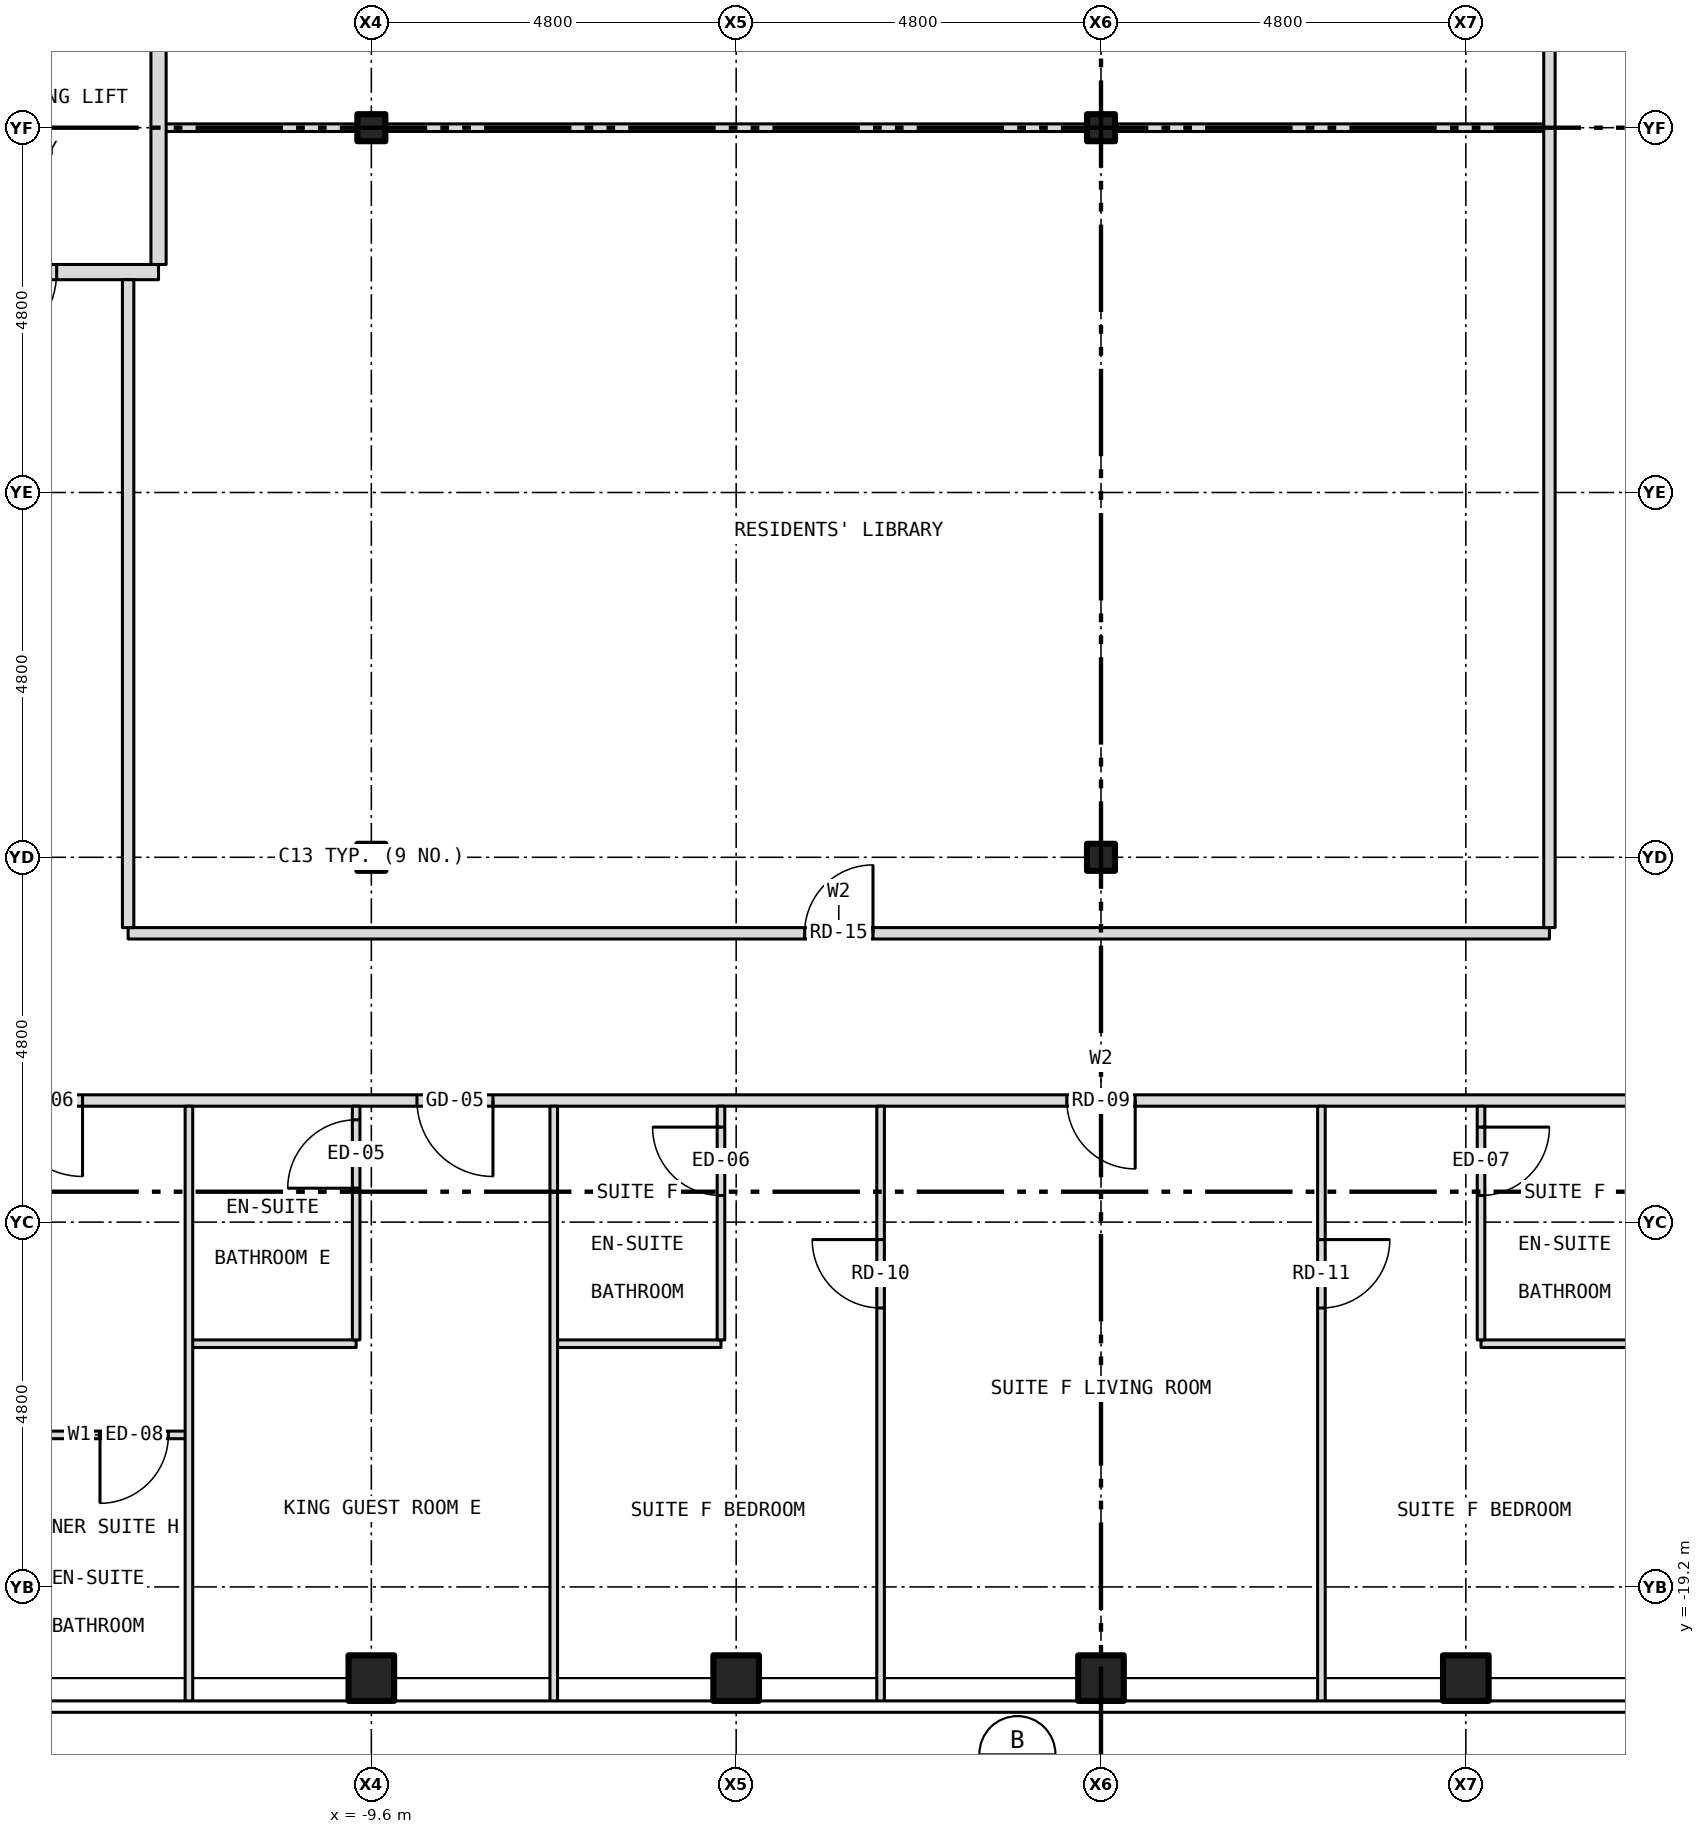
"""IFC4 building model, lengths in metres.
Left out: names, types, materials, properties, quantities, classifications, styles, units other than length and angle.
Written with IfcOpenShell. Run it as: python <this file> out.ifc"""

import sys

from ifc_helpers import new_model, si_unit, direction, frame, frame_2d, origin, origin_2d, place, context, subcontext, project, spatial, rectangle, hollow_rectangle, i_section, extrude, element, fill, save


model = new_model("IFC4")
c1 = context("Model", 3, precision=1e-05, world=origin(), true_north=direction((0.0, 1.0)))
c2 = subcontext(c1, "Body", "Model", "MODEL_VIEW")
j1 = project(units=[si_unit("LENGTHUNIT", "METRE"), si_unit("PLANEANGLEUNIT", "RADIAN")], contexts=[c1])
p1 = place(None, origin())
s1 = spatial("IfcSite", under=j1, at=p1, CompositionType="ELEMENT")
p2 = place(p1, origin())
s2 = spatial("IfcBuilding", under=s1, at=p2, CompositionType="ELEMENT")
p3 = place(p2, frame((0.0, 0.0, 262.0)))
s3 = spatial("IfcBuildingStorey", under=s2, at=p3, CompositionType="ELEMENT", Elevation=262.0)
for number, where, z_axis, x_axis in (
    (1, (-9.6, -20.4, -0.15), (0.0, 0.0, 1.0), (1.0, 0.0, 0.0)),
    (2, (-4.8, -20.4, -0.15), (0.0, 0.0, 1.0), (1.0, 0.0, 0.0)),
    (3, (0.0, -20.4, -0.15), (0.0, 0.0, 1.0), (1.0, 0.0, 0.0)),
    (4, (4.8, -20.4, -0.15), (0.0, 0.0, 1.0), (1.0, 0.0, 0.0)),
):
    element("IfcColumn", number, at=place(p3, frame(where, z_axis=z_axis, x_axis=x_axis)), inside=s3, PredefinedType="COLUMN", context=c2, shape_type="SweptSolid", body=[
        extrude(hollow_rectangle(XDim=0.6, YDim=0.6, WallThickness=0.03, at=origin_2d()), origin(), (0.0, 0.0, 1.0), 3.4),
    ])
for number, where, z_axis, x_axis in (
    (5, (-9.6, -9.6, -0.15), (0.0, 0.0, 1.0), (1.0, 0.0, 0.0)),
    (6, (-9.6, 0.0, -0.15), (0.0, 0.0, 1.0), (1.0, 0.0, 0.0)),
    (7, (0.0, -9.6, -0.15), (0.0, 0.0, 1.0), (1.0, 0.0, 0.0)),
    (8, (0.0, 0.0, -0.15), (0.0, 0.0, 1.0), (1.0, 0.0, 0.0)),
):
    element("IfcColumn", number, at=place(p3, frame(where, z_axis=z_axis, x_axis=x_axis)), inside=s3, PredefinedType="COLUMN", context=c2, shape_type="SweptSolid", body=[
        extrude(i_section(OverallWidth=0.368, OverallDepth=0.356, WebThickness=0.011, FlangeThickness=0.018, at=origin_2d()), origin(), (0.0, 0.0, 1.0), 3.4),
    ])
p4 = place(p3, frame((-14.28, -17.2, 0.0), z_axis=(0.0, 0.0, 1.0), x_axis=(1.0, 0.0, 0.0)))
e9 = element("IfcWall", 9, at=p4, inside=s3, PredefinedType="PARTITIONING", context=c2, shape_type="SweptSolid", body=[
    extrude(rectangle(XDim=2.28, YDim=0.1, at=frame_2d((1.14, 0.0))), origin(), (0.0, 0.0, 1.0), 3.25),
])
p5 = place(p4, frame((1.11, 0.0, 0.0)))
e10 = element("IfcOpeningElement", 10, at=p5, cuts=e9, PredefinedType="OPENING", context=c2, shape_type="SweptSolid", body=[
    extrude(rectangle(XDim=0.9, YDim=2.1, at=frame_2d((0.45, 1.05))), frame((0.0, 0.062, 0.0), z_axis=(0.0, -1.0, 0.0), x_axis=(1.0, 0.0, 0.0)), (0.0, 0.0, 1.0), 0.124),
])
for number, where, z_axis, x_axis in (
    (11, (-12.0, -16.0, 0.0), (0.0, 0.0, 1.0), (1.0, 0.0, 0.0)),
    (12, (-7.2, -16.0, 0.0), (0.0, 0.0, 1.0), (1.0, 0.0, 0.0)),
    (13, (5.0, -16.0, 0.0), (0.0, 0.0, 1.0), (1.0, 0.0, 0.0)),
):
    element("IfcWall", number, at=place(p3, frame(where, z_axis=z_axis, x_axis=x_axis)), inside=s3, PredefinedType="PARTITIONING", context=c2, shape_type="SweptSolid", body=[
        extrude(rectangle(XDim=2.2, YDim=0.1, at=frame_2d((1.1, 0.0))), origin(), (0.0, 0.0, 1.0), 3.25),
    ])
p6 = place(p3, frame((-15.8, -12.8, 0.0), z_axis=(0.0, 0.0, 1.0), x_axis=(1.0, 0.0, 0.0)))
e14 = element("IfcWall", 14, at=p6, inside=s3, PredefinedType="PARTITIONING", context=c2, shape_type="SweptSolid", body=[
    extrude(rectangle(XDim=31.6, YDim=0.15, at=frame_2d((15.8, 0.0))), origin(), (0.0, 0.0, 1.0), 3.25),
])
p7 = place(p6, frame((6.8, 0.0, 0.0)))
e15 = element("IfcOpeningElement", 15, at=p7, cuts=e14, PredefinedType="OPENING", context=c2, shape_type="SweptSolid", body=[
    extrude(rectangle(XDim=1.0, YDim=2.1, at=frame_2d((0.5, 1.05))), frame((0.0, 0.087, 0.0), z_axis=(0.0, -1.0, 0.0), x_axis=(1.0, 0.0, 0.0)), (0.0, 0.0, 1.0), 0.174),
])
p8 = place(p6, frame((15.35, 0.0, 0.0)))
e16 = element("IfcOpeningElement", 16, at=p8, cuts=e14, PredefinedType="OPENING", context=c2, shape_type="SweptSolid", body=[
    extrude(rectangle(XDim=0.9, YDim=2.1, at=frame_2d((0.45, 1.05))), frame((0.0, 0.087, 0.0), z_axis=(0.0, -1.0, 0.0), x_axis=(1.0, 0.0, 0.0)), (0.0, 0.0, 1.0), 0.174),
])
p9 = place(p6, frame((24.95, 0.0, 0.0)))
e17 = element("IfcOpeningElement", 17, at=p9, cuts=e14, PredefinedType="OPENING", context=c2, shape_type="SweptSolid", body=[
    extrude(rectangle(XDim=0.9, YDim=2.1, at=frame_2d((0.45, 1.05))), frame((0.0, 0.087, 0.0), z_axis=(0.0, -1.0, 0.0), x_axis=(1.0, 0.0, 0.0)), (0.0, 0.0, 1.0), 0.174),
])
p10 = place(p6, frame((1.4, 0.0, 0.0)))
e18 = element("IfcOpeningElement", 18, at=p10, cuts=e14, PredefinedType="OPENING", context=c2, shape_type="SweptSolid", body=[
    extrude(rectangle(XDim=1.0, YDim=2.1, at=frame_2d((0.5, 1.05))), frame((0.0, 0.087, 0.0), z_axis=(0.0, -1.0, 0.0), x_axis=(1.0, 0.0, 0.0)), (0.0, 0.0, 1.0), 0.174),
])
p11 = place(p6, frame((29.2, 0.0, 0.0)))
e19 = element("IfcOpeningElement", 19, at=p11, cuts=e14, PredefinedType="OPENING", context=c2, shape_type="SweptSolid", body=[
    extrude(rectangle(XDim=1.0, YDim=2.1, at=frame_2d((0.5, 1.05))), frame((0.0, 0.087, 0.0), z_axis=(0.0, -1.0, 0.0), x_axis=(1.0, 0.0, 0.0)), (0.0, 0.0, 1.0), 0.174),
])
p12 = place(p3, frame((-12.8, -10.6, 0.0), z_axis=(0.0, 0.0, 1.0), x_axis=(1.0, 0.0, 0.0)))
e20 = element("IfcWall", 20, at=p12, inside=s3, PredefinedType="PARTITIONING", context=c2, shape_type="SweptSolid", body=[
    extrude(rectangle(XDim=18.7, YDim=0.15, at=frame_2d((9.35, 0.0))), origin(), (0.0, 0.0, 1.0), 3.25),
])
p13 = place(p12, frame((8.9, 0.0, 0.0)))
e21 = element("IfcOpeningElement", 21, at=p13, cuts=e20, PredefinedType="OPENING", context=c2, shape_type="SweptSolid", body=[
    extrude(rectangle(XDim=0.9, YDim=2.1, at=frame_2d((0.45, 1.05))), frame((0.0, 0.087, 0.0), z_axis=(0.0, -1.0, 0.0), x_axis=(1.0, 0.0, 0.0)), (0.0, 0.0, 1.0), 0.174),
])
p14 = place(p3, frame((-15.68, -1.9, 0.0), z_axis=(0.0, 0.0, 1.0), x_axis=(1.0, 0.0, 0.0)))
e22 = element("IfcWall", 22, at=p14, inside=s3, PredefinedType="PARTITIONING", context=c2, shape_type="SweptSolid", body=[
    extrude(rectangle(XDim=3.28, YDim=0.2, at=frame_2d((1.64, 0.0))), origin(), (0.0, 0.0, 1.0), 3.25),
])
p15 = place(p14, frame((0.84, 0.0, 0.0)))
e23 = element("IfcOpeningElement", 23, at=p15, cuts=e22, PredefinedType="OPENING", context=c2, shape_type="SweptSolid", body=[
    extrude(rectangle(XDim=1.1, YDim=2.1, at=frame_2d((0.55, 1.05))), frame((0.0, 0.112, 0.0), z_axis=(0.0, -1.0, 0.0), x_axis=(1.0, 0.0, 0.0)), (0.0, 0.0, 1.0), 0.224),
])
p16 = place(p3, frame((-12.4, 0.0, 0.0), z_axis=(0.0, 0.0, 1.0), x_axis=(1.0, 0.0, 0.0)))
e24 = element("IfcWall", 24, at=p16, inside=s3, PredefinedType="PARTITIONING", context=c2, shape_type="SweptSolid", body=[
    extrude(rectangle(XDim=2.616, YDim=0.1, at=frame_2d((1.308, 0.0))), origin(), (0.0, 0.0, 1.0), 2.16),
])
p17 = place(p3, frame((-9.784, 0.0, 0.0), z_axis=(0.0, 0.0, 1.0), x_axis=(1.0, 0.0, 0.0)))
e25 = element("IfcWall", 25, at=p17, inside=s3, PredefinedType="PARTITIONING", context=c2, shape_type="SweptSolid", body=[
    extrude(rectangle(XDim=0.368, YDim=0.1, at=frame_2d((0.184, 0.0))), origin(), (0.0, 0.0, 1.0), 3.25),
])
p18 = place(p3, frame((-9.416, 0.0, 0.0), z_axis=(0.0, 0.0, 1.0), x_axis=(1.0, 0.0, 0.0)))
e26 = element("IfcWall", 26, at=p18, inside=s3, PredefinedType="PARTITIONING", context=c2, shape_type="SweptSolid", body=[
    extrude(rectangle(XDim=9.232, YDim=0.1, at=frame_2d((4.616, 0.0))), origin(), (0.0, 0.0, 1.0), 2.16),
])
p19 = place(p3, frame((-0.184, 0.0, 0.0), z_axis=(0.0, 0.0, 1.0), x_axis=(1.0, 0.0, 0.0)))
e27 = element("IfcWall", 27, at=p19, inside=s3, PredefinedType="PARTITIONING", context=c2, shape_type="SweptSolid", body=[
    extrude(rectangle(XDim=0.368, YDim=0.1, at=frame_2d((0.184, 0.0))), origin(), (0.0, 0.0, 1.0), 3.25),
])
p20 = place(p3, frame((0.184, 0.0, 0.0), z_axis=(0.0, 0.0, 1.0), x_axis=(1.0, 0.0, 0.0)))
e28 = element("IfcWall", 28, at=p20, inside=s3, PredefinedType="PARTITIONING", context=c2, shape_type="SweptSolid", body=[
    extrude(rectangle(XDim=5.716, YDim=0.1, at=frame_2d((2.858, 0.0))), origin(), (0.0, 0.0, 1.0), 2.16),
])
p21 = place(p3, frame((-12.8, -10.525, 0.0), z_axis=(0.0, 0.0, 1.0), x_axis=(0.0, 1.0, 0.0)))
e29 = element("IfcWall", 29, at=p21, inside=s3, PredefinedType="PARTITIONING", context=c2, shape_type="SweptSolid", body=[
    extrude(rectangle(XDim=8.525, YDim=0.15, at=frame_2d((4.262, 0.0))), origin(), (0.0, 0.0, 1.0), 3.25),
])
p22 = place(p3, frame((-12.4, -1.8, 0.0), z_axis=(0.0, 0.0, 1.0), x_axis=(0.0, 1.0, 0.0)))
e30 = element("IfcWall", 30, at=p22, inside=s3, PredefinedType="PARTITIONING", context=c2, shape_type="SweptSolid", body=[
    extrude(rectangle(XDim=4.0, YDim=0.2, at=frame_2d((2.0, 0.0))), origin(), (0.0, 0.0, 1.0), 3.25),
])
p23 = place(p3, frame((-12.0, -20.73, 0.0), z_axis=(0.0, 0.0, 1.0), x_axis=(0.0, 1.0, 0.0)))
e31 = element("IfcWall", 31, at=p23, inside=s3, PredefinedType="PARTITIONING", context=c2, shape_type="SweptSolid", body=[
    extrude(rectangle(XDim=7.855, YDim=0.1, at=frame_2d((3.927, 0.0))), origin(), (0.0, 0.0, 1.0), 3.25),
])
p24 = place(p3, frame((-9.8, -15.95, 0.0), z_axis=(0.0, 0.0, 1.0), x_axis=(0.0, 1.0, 0.0)))
e32 = element("IfcWall", 32, at=p24, inside=s3, PredefinedType="PARTITIONING", context=c2, shape_type="SweptSolid", body=[
    extrude(rectangle(XDim=3.075, YDim=0.1, at=frame_2d((1.538, 0.0))), origin(), (0.0, 0.0, 1.0), 2.628),
])
p25 = place(p24, frame((1.996, 0.0, 0.0)))
e33 = element("IfcOpeningElement", 33, at=p25, cuts=e32, PredefinedType="OPENING", context=c2, shape_type="SweptSolid", body=[
    extrude(rectangle(XDim=0.9, YDim=2.1, at=frame_2d((0.45, 1.05))), frame((0.0, 0.062, 0.0), z_axis=(0.0, -1.0, 0.0), x_axis=(1.0, 0.0, 0.0)), (0.0, 0.0, 1.0), 0.124),
])
p26 = place(p3, frame((-7.2, -20.73, 0.0), z_axis=(0.0, 0.0, 1.0), x_axis=(0.0, 1.0, 0.0)))
e34 = element("IfcWall", 34, at=p26, inside=s3, PredefinedType="PARTITIONING", context=c2, shape_type="SweptSolid", body=[
    extrude(rectangle(XDim=7.855, YDim=0.1, at=frame_2d((3.927, 0.0))), origin(), (0.0, 0.0, 1.0), 3.25),
])
p27 = place(p3, frame((-5.0, -15.95, 0.0), z_axis=(0.0, 0.0, 1.0), x_axis=(0.0, 1.0, 0.0)))
e35 = element("IfcWall", 35, at=p27, inside=s3, PredefinedType="PARTITIONING", context=c2, shape_type="SweptSolid", body=[
    extrude(rectangle(XDim=3.075, YDim=0.1, at=frame_2d((1.538, 0.0))), origin(), (0.0, 0.0, 1.0), 3.25),
])
p28 = place(p27, frame((1.9, 0.0, 0.0)))
e36 = element("IfcOpeningElement", 36, at=p28, cuts=e35, PredefinedType="OPENING", context=c2, shape_type="SweptSolid", body=[
    extrude(rectangle(XDim=0.9, YDim=2.1, at=frame_2d((0.45, 1.05))), frame((0.0, 0.062, 0.0), z_axis=(0.0, -1.0, 0.0), x_axis=(1.0, 0.0, 0.0)), (0.0, 0.0, 1.0), 0.124),
])
p29 = place(p3, frame((-2.9, -20.73, 0.0), z_axis=(0.0, 0.0, 1.0), x_axis=(0.0, 1.0, 0.0)))
e37 = element("IfcWall", 37, at=p29, inside=s3, PredefinedType="PARTITIONING", context=c2, shape_type="SweptSolid", body=[
    extrude(rectangle(XDim=7.855, YDim=0.1, at=frame_2d((3.927, 0.0))), origin(), (0.0, 0.0, 1.0), 3.25),
])
p30 = place(p29, frame((5.2, 0.0, 0.0)))
e38 = element("IfcOpeningElement", 38, at=p30, cuts=e37, PredefinedType="OPENING", context=c2, shape_type="SweptSolid", body=[
    extrude(rectangle(XDim=0.9, YDim=2.1, at=frame_2d((0.45, 1.05))), frame((0.0, 0.062, 0.0), z_axis=(0.0, -1.0, 0.0), x_axis=(1.0, 0.0, 0.0)), (0.0, 0.0, 1.0), 0.124),
])
p31 = place(p3, frame((2.9, -20.73, 0.0), z_axis=(0.0, 0.0, 1.0), x_axis=(0.0, 1.0, 0.0)))
e39 = element("IfcWall", 39, at=p31, inside=s3, PredefinedType="PARTITIONING", context=c2, shape_type="SweptSolid", body=[
    extrude(rectangle(XDim=7.855, YDim=0.1, at=frame_2d((3.927, 0.0))), origin(), (0.0, 0.0, 1.0), 3.25),
])
p32 = place(p31, frame((5.2, 0.0, 0.0)))
e40 = element("IfcOpeningElement", 40, at=p32, cuts=e39, PredefinedType="OPENING", context=c2, shape_type="SweptSolid", body=[
    extrude(rectangle(XDim=0.9, YDim=2.1, at=frame_2d((0.45, 1.05))), frame((0.0, 0.062, 0.0), z_axis=(0.0, -1.0, 0.0), x_axis=(1.0, 0.0, 0.0)), (0.0, 0.0, 1.0), 0.124),
])
p33 = place(p3, frame((5.0, -15.95, 0.0), z_axis=(0.0, 0.0, 1.0), x_axis=(0.0, 1.0, 0.0)))
e41 = element("IfcWall", 41, at=p33, inside=s3, PredefinedType="PARTITIONING", context=c2, shape_type="SweptSolid", body=[
    extrude(rectangle(XDim=3.075, YDim=0.1, at=frame_2d((1.538, 0.0))), origin(), (0.0, 0.0, 1.0), 3.25),
])
p34 = place(p33, frame((1.9, 0.0, 0.0)))
e42 = element("IfcOpeningElement", 42, at=p34, cuts=e41, PredefinedType="OPENING", context=c2, shape_type="SweptSolid", body=[
    extrude(rectangle(XDim=0.9, YDim=2.1, at=frame_2d((0.45, 1.05))), frame((0.0, 0.062, 0.0), z_axis=(0.0, -1.0, 0.0), x_axis=(1.0, 0.0, 0.0)), (0.0, 0.0, 1.0), 0.124),
])
p35 = place(p3, frame((5.9, -10.525, 0.0), z_axis=(0.0, 0.0, 1.0), x_axis=(0.0, 1.0, 0.0)))
e43 = element("IfcWall", 43, at=p35, inside=s3, PredefinedType="PARTITIONING", context=c2, shape_type="SweptSolid", body=[
    extrude(rectangle(XDim=17.95, YDim=0.15, at=frame_2d((8.975, 0.0))), origin(), (0.0, 0.0, 1.0), 3.25),
])
p36 = place(p15, origin())
e44 = element("IfcDoor", 44, at=p36, inside=s3, OperationType="SINGLE_SWING_LEFT", PredefinedType="DOOR", context=c2, shape_type="SweptSolid", body=[
    extrude(rectangle(XDim=1.1, YDim=2.1, at=frame_2d((0.55, 1.05))), frame((0.0, 0.025, 0.0), z_axis=(0.0, -1.0, 0.0), x_axis=(1.0, 0.0, 0.0)), (0.0, 0.0, 1.0), 0.05),
])
fill(e23, e44)
p37 = place(p7, origin())
e45 = element("IfcDoor", 45, at=p37, inside=s3, OperationType="SINGLE_SWING_RIGHT", PredefinedType="DOOR", context=c2, shape_type="SweptSolid", body=[
    extrude(rectangle(XDim=1.0, YDim=2.1, at=frame_2d((0.5, 1.05))), frame((0.0, 0.025, 0.0), z_axis=(0.0, -1.0, 0.0), x_axis=(1.0, 0.0, 0.0)), (0.0, 0.0, 1.0), 0.05),
])
fill(e15, e45)
p38 = place(p25, origin())
e46 = element("IfcDoor", 46, at=p38, inside=s3, OperationType="SINGLE_SWING_LEFT", PredefinedType="DOOR", context=c2, shape_type="SweptSolid", body=[
    extrude(rectangle(XDim=0.9, YDim=2.1, at=frame_2d((0.45, 1.05))), frame((0.0, 0.025, 0.0), z_axis=(0.0, -1.0, 0.0), x_axis=(1.0, 0.0, 0.0)), (0.0, 0.0, 1.0), 0.05),
])
fill(e33, e46)
p39 = place(p8, origin())
e47 = element("IfcDoor", 47, at=p39, inside=s3, OperationType="SINGLE_SWING_RIGHT", PredefinedType="DOOR", context=c2, shape_type="SweptSolid", body=[
    extrude(rectangle(XDim=0.9, YDim=2.1, at=frame_2d((0.45, 1.05))), frame((0.0, 0.025, 0.0), z_axis=(0.0, -1.0, 0.0), x_axis=(1.0, 0.0, 0.0)), (0.0, 0.0, 1.0), 0.05),
])
fill(e16, e47)
p40 = place(p30, origin())
e48 = element("IfcDoor", 48, at=p40, inside=s3, OperationType="SINGLE_SWING_RIGHT", PredefinedType="DOOR", context=c2, shape_type="SweptSolid", body=[
    extrude(rectangle(XDim=0.9, YDim=2.1, at=frame_2d((0.45, 1.05))), frame((0.0, 0.025, 0.0), z_axis=(0.0, -1.0, 0.0), x_axis=(1.0, 0.0, 0.0)), (0.0, 0.0, 1.0), 0.05),
])
fill(e38, e48)
p41 = place(p28, origin())
e49 = element("IfcDoor", 49, at=p41, inside=s3, OperationType="SINGLE_SWING_RIGHT", PredefinedType="DOOR", context=c2, shape_type="SweptSolid", body=[
    extrude(rectangle(XDim=0.9, YDim=2.1, at=frame_2d((0.45, 1.05))), frame((0.0, 0.025, 0.0), z_axis=(0.0, -1.0, 0.0), x_axis=(1.0, 0.0, 0.0)), (0.0, 0.0, 1.0), 0.05),
])
fill(e36, e49)
p42 = place(p32, origin())
e50 = element("IfcDoor", 50, at=p42, inside=s3, OperationType="SINGLE_SWING_RIGHT", PredefinedType="DOOR", context=c2, shape_type="SweptSolid", body=[
    extrude(rectangle(XDim=0.9, YDim=2.1, at=frame_2d((0.45, 1.05))), frame((0.0, 0.025, 0.0), z_axis=(0.0, -1.0, 0.0), x_axis=(1.0, 0.0, 0.0)), (0.0, 0.0, 1.0), 0.05),
])
fill(e40, e50)
p43 = place(p34, origin())
e51 = element("IfcDoor", 51, at=p43, inside=s3, OperationType="SINGLE_SWING_RIGHT", PredefinedType="DOOR", context=c2, shape_type="SweptSolid", body=[
    extrude(rectangle(XDim=0.9, YDim=2.1, at=frame_2d((0.45, 1.05))), frame((0.0, 0.025, 0.0), z_axis=(0.0, -1.0, 0.0), x_axis=(1.0, 0.0, 0.0)), (0.0, 0.0, 1.0), 0.05),
])
fill(e42, e51)
p44 = place(p5, origin())
e52 = element("IfcDoor", 52, at=p44, inside=s3, OperationType="SINGLE_SWING_LEFT", PredefinedType="DOOR", context=c2, shape_type="SweptSolid", body=[
    extrude(rectangle(XDim=0.9, YDim=2.1, at=frame_2d((0.45, 1.05))), frame((0.0, 0.025, 0.0), z_axis=(0.0, -1.0, 0.0), x_axis=(1.0, 0.0, 0.0)), (0.0, 0.0, 1.0), 0.05),
])
fill(e10, e52)
p45 = place(p10, origin())
e53 = element("IfcDoor", 53, at=p45, inside=s3, OperationType="SINGLE_SWING_RIGHT", PredefinedType="DOOR", context=c2, shape_type="SweptSolid", body=[
    extrude(rectangle(XDim=1.0, YDim=2.1, at=frame_2d((0.5, 1.05))), frame((0.0, 0.025, 0.0), z_axis=(0.0, -1.0, 0.0), x_axis=(1.0, 0.0, 0.0)), (0.0, 0.0, 1.0), 0.05),
])
fill(e18, e53)
p46 = place(p13, origin())
e54 = element("IfcDoor", 54, at=p46, inside=s3, OperationType="SINGLE_SWING_RIGHT", PredefinedType="DOOR", context=c2, shape_type="SweptSolid", body=[
    extrude(rectangle(XDim=0.9, YDim=2.1, at=frame_2d((0.45, 1.05))), frame((0.0, 0.025, 0.0), z_axis=(0.0, -1.0, 0.0), x_axis=(1.0, 0.0, 0.0)), (0.0, 0.0, 1.0), 0.05),
])
fill(e21, e54)
save(model, sys.argv[1])
